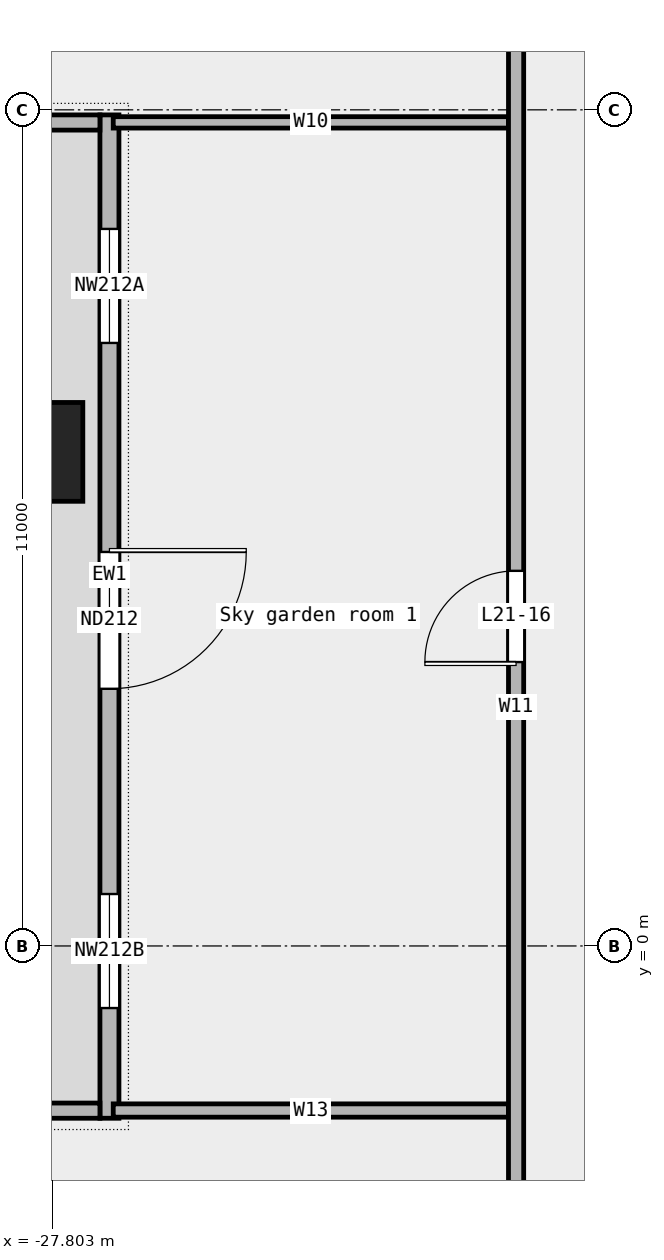
"""IFC4 building model, lengths in metres.
Left out: names, types, materials, properties, quantities, classifications, styles, units other than length and angle.
Written with IfcOpenShell. Run it as: python <this file> out.ifc"""

import sys

from ifc_helpers import new_model, si_unit, direction, frame, frame_2d, origin, origin_2d, place, context, subcontext, project, spatial, rectangle, extrude, element, fill, save


model = new_model("IFC4")
c1 = context("Model", 3, precision=1e-05, world=origin(), true_north=direction((0.0, 1.0)))
c2 = subcontext(c1, "Body", "Model", "MODEL_VIEW")
j1 = project(units=[si_unit("LENGTHUNIT", "METRE"), si_unit("PLANEANGLEUNIT", "RADIAN")], contexts=[c1])
p1 = place(None, origin())
s1 = spatial("IfcSite", under=j1, at=p1, CompositionType="ELEMENT")
p2 = place(p1, origin())
s2 = spatial("IfcBuilding", under=s1, at=p2, CompositionType="ELEMENT")
p3 = place(p2, frame((0.0, 0.0, 108.1)))
s3 = spatial("IfcBuildingStorey", under=s2, at=p3, CompositionType="ELEMENT", Elevation=108.1)
p4 = place(p3, frame((-28.05, 6.5, 0.0), z_axis=(0.0, 0.0, 1.0), x_axis=(1.0, 0.0, 0.0)))
e1 = element("IfcColumn", 1, at=p4, inside=s3, PredefinedType="COLUMN", context=c2, shape_type="SweptSolid", body=[
    extrude(rectangle(XDim=1.3, YDim=1.3, at=origin_2d()), origin(), (0.0, 0.0, 1.0), 4.05),
])
p5 = place(p3, frame((-27.05, 10.933, 0.0), z_axis=(0.0, 0.0, 1.0), x_axis=(0.0, -1.0, 0.0)))
e2 = element("IfcWall", 2, at=p5, inside=s3, PredefinedType="STANDARD", context=c2, shape_type="SweptSolid", body=[
    extrude(rectangle(XDim=13.2, YDim=0.25, at=frame_2d((6.6, 0.0))), origin(), (0.0, 0.0, 1.0), 4.05),
])
p6 = place(p5, frame((1.5, 0.0, 0.45)))
e3 = element("IfcOpeningElement", 3, at=p6, cuts=e2, PredefinedType="OPENING", context=c2, shape_type="SweptSolid", body=[
    extrude(rectangle(XDim=1.5, YDim=3.0, at=frame_2d((0.75, 1.5))), frame((0.0, 0.137, 0.0), z_axis=(0.0, -1.0, 0.0), x_axis=(1.0, 0.0, 0.0)), (0.0, 0.0, 1.0), 0.274),
])
p7 = place(p5, frame((5.75, 0.0, 0.0)))
e4 = element("IfcOpeningElement", 4, at=p7, cuts=e2, PredefinedType="OPENING", context=c2, shape_type="SweptSolid", body=[
    extrude(rectangle(XDim=1.8, YDim=2.4, at=frame_2d((0.9, 1.2))), frame((0.0, 0.137, 0.0), z_axis=(0.0, -1.0, 0.0), x_axis=(1.0, 0.0, 0.0)), (0.0, 0.0, 1.0), 0.274),
])
p8 = place(p5, frame((10.25, 0.0, 0.45)))
e5 = element("IfcOpeningElement", 5, at=p8, cuts=e2, PredefinedType="OPENING", context=c2, shape_type="SweptSolid", body=[
    extrude(rectangle(XDim=1.5, YDim=3.0, at=frame_2d((0.75, 1.5))), frame((0.0, 0.137, 0.0), z_axis=(0.0, -1.0, 0.0), x_axis=(1.0, 0.0, 0.0)), (0.0, 0.0, 1.0), 0.274),
])
for number, where, z_axis, x_axis in (
    (6, (-29.05, 10.833, 0.0), (0.0, 0.0, 1.0), (1.0, 0.0, 0.0)),
    (7, (-29.05, -2.167, 0.0), (0.0, 0.0, 1.0), (1.0, 0.0, 0.0)),
):
    element("IfcWall", number, at=place(p3, frame(where, z_axis=z_axis, x_axis=x_axis)), inside=s3, PredefinedType="STANDARD", context=c2, shape_type="SweptSolid", body=[
        extrude(rectangle(XDim=1.875, YDim=0.2, at=frame_2d((0.938, 0.0))), origin(), (0.0, 0.0, 1.0), 4.05),
    ])
p9 = place(p3, frame((-27.0, -2.165, 0.0), z_axis=(0.0, 0.0, 1.0), x_axis=(1.0, 0.0, 0.0)))
e8 = element("IfcWall", 8, at=p9, inside=s3, PredefinedType="PARTITIONING", context=c2, shape_type="SweptSolid", body=[
    extrude(rectangle(XDim=5.2, YDim=0.175, at=frame_2d((2.6, 0.0))), origin(), (0.0, 0.0, 1.0), 4.05),
])
p10 = place(p3, frame((-27.0, 10.835, 0.0), z_axis=(0.0, 0.0, 1.0), x_axis=(1.0, 0.0, 0.0)))
e9 = element("IfcWall", 9, at=p10, inside=s3, PredefinedType="PARTITIONING", context=c2, shape_type="SweptSolid", body=[
    extrude(rectangle(XDim=5.2, YDim=0.15, at=frame_2d((2.6, 0.0))), origin(), (0.0, 0.0, 1.0), 4.05),
])
p11 = place(p3, frame((-21.7, -8.975, 0.0), z_axis=(0.0, 0.0, 1.0), x_axis=(0.0, 1.0, 0.0)))
e10 = element("IfcWall", 10, at=p11, inside=s3, PredefinedType="PARTITIONING", context=c2, shape_type="SweptSolid", body=[
    extrude(rectangle(XDim=24.25, YDim=0.2, at=frame_2d((12.125, 0.0))), origin(), (0.0, 0.0, 1.0), 4.05),
])
p12 = place(p11, frame((2.805, 0.0, 0.0)))
e11 = element("IfcOpeningElement", 11, at=p12, cuts=e10, PredefinedType="OPENING", context=c2, shape_type="SweptSolid", body=[
    extrude(rectangle(XDim=1.2, YDim=2.1, at=frame_2d((0.6, 1.05))), frame((0.0, 0.112, 0.0), z_axis=(0.0, -1.0, 0.0), x_axis=(1.0, 0.0, 0.0)), (0.0, 0.0, 1.0), 0.224),
])
p13 = place(p11, frame((21.58, 0.0, 0.0)))
e12 = element("IfcOpeningElement", 12, at=p13, cuts=e10, PredefinedType="OPENING", context=c2, shape_type="SweptSolid", body=[
    extrude(rectangle(XDim=0.9, YDim=2.1, at=frame_2d((0.45, 1.05))), frame((0.0, 0.112, 0.0), z_axis=(0.0, -1.0, 0.0), x_axis=(1.0, 0.0, 0.0)), (0.0, 0.0, 1.0), 0.224),
])
p14 = place(p11, frame((12.71, 0.0, 0.0)))
e13 = element("IfcOpeningElement", 13, at=p14, cuts=e10, PredefinedType="OPENING", context=c2, shape_type="SweptSolid", body=[
    extrude(rectangle(XDim=1.2, YDim=2.1, at=frame_2d((0.6, 1.05))), frame((0.0, 0.112, 0.0), z_axis=(0.0, -1.0, 0.0), x_axis=(1.0, 0.0, 0.0)), (0.0, 0.0, 1.0), 0.224),
])
p15 = place(p6, origin())
e14 = element("IfcWindow", 14, at=p15, inside=s3, PartitioningType="SINGLE_PANEL", PredefinedType="WINDOW", context=c2, shape_type="SweptSolid", body=[
    extrude(rectangle(XDim=1.5, YDim=3.0, at=frame_2d((0.75, 1.5))), frame((0.0, 0.03, 0.0), z_axis=(0.0, -1.0, 0.0), x_axis=(1.0, 0.0, 0.0)), (0.0, 0.0, 1.0), 0.06),
])
fill(e3, e14)
p16 = place(p7, origin())
e15 = element("IfcDoor", 15, at=p16, inside=s3, OperationType="DOUBLE_DOOR_SINGLE_SWING", PredefinedType="DOOR", context=c2, shape_type="SweptSolid", body=[
    extrude(rectangle(XDim=1.8, YDim=2.4, at=frame_2d((0.9, 1.2))), frame((0.0, 0.025, 0.0), z_axis=(0.0, -1.0, 0.0), x_axis=(1.0, 0.0, 0.0)), (0.0, 0.0, 1.0), 0.05),
])
fill(e4, e15)
p17 = place(p8, origin())
e16 = element("IfcWindow", 16, at=p17, inside=s3, PartitioningType="SINGLE_PANEL", PredefinedType="WINDOW", context=c2, shape_type="SweptSolid", body=[
    extrude(rectangle(XDim=1.5, YDim=3.0, at=frame_2d((0.75, 1.5))), frame((0.0, 0.03, 0.0), z_axis=(0.0, -1.0, 0.0), x_axis=(1.0, 0.0, 0.0)), (0.0, 0.0, 1.0), 0.06),
])
fill(e5, e16)
p18 = place(p14, origin())
e17 = element("IfcDoor", 17, at=p18, inside=s3, OperationType="SINGLE_SWING_LEFT", PredefinedType="DOOR", context=c2, shape_type="SweptSolid", body=[
    extrude(rectangle(XDim=1.2, YDim=2.1, at=frame_2d((0.6, 1.05))), frame((0.0, 0.025, 0.0), z_axis=(0.0, -1.0, 0.0), x_axis=(1.0, 0.0, 0.0)), (0.0, 0.0, 1.0), 0.05),
])
fill(e13, e17)
save(model, sys.argv[1])
